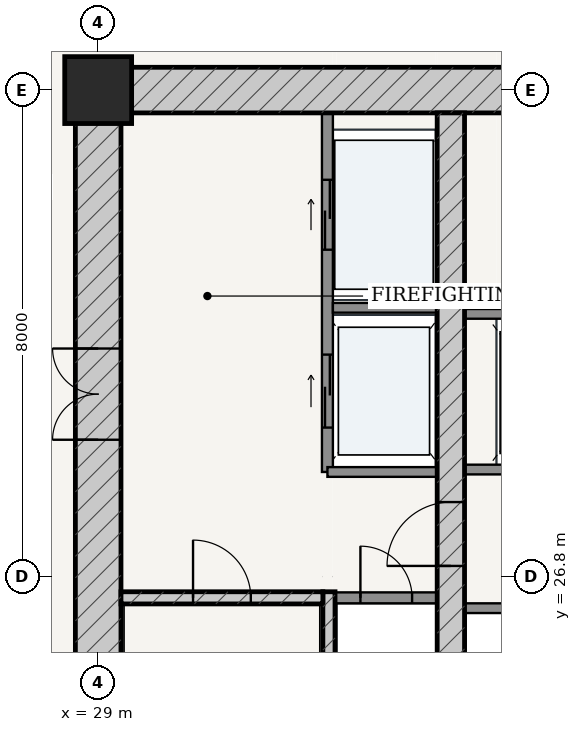
"""IFC4 building model, lengths in metres.
Left out: names, types, materials, properties, quantities, classifications, styles, units other than length and angle.
Written with IfcOpenShell. Run it as: python <this file> out.ifc"""

import sys

from ifc_helpers import new_model, si_unit, direction, frame, frame_2d, origin, origin_2d, place, context, subcontext, project, spatial, rectangle, extrude, source, transform, mapped, element, fill, save


model = new_model("IFC4")
c1 = context("Model", 3, precision=1e-05, world=origin(), true_north=direction((-0.2419218956, 0.970295726276)))
c2 = subcontext(c1, "Body", "Model", "MODEL_VIEW")
j1 = project(units=[si_unit("LENGTHUNIT", "METRE"), si_unit("PLANEANGLEUNIT", "RADIAN")], contexts=[c1])
p1 = place(None, origin())
s1 = spatial("IfcSite", under=j1, at=p1, CompositionType="ELEMENT")
p2 = place(p1, origin())
s2 = spatial("IfcBuilding", under=s1, at=p2, CompositionType="ELEMENT")
p3 = place(p2, frame((0.0, 0.0, 63.6)))
s3 = spatial("IfcBuildingStorey", under=s2, at=p3, CompositionType="ELEMENT", Elevation=63.6)
p4 = place(p3, frame((29.0, 34.8, 0.0), z_axis=(0.0, 0.0, 1.0), x_axis=(1.0, 0.0, 0.0)))
e1 = element("IfcColumn", 1, at=p4, inside=s3, PredefinedType="COLUMN", context=c2, shape_type="SweptSolid", body=[
    extrude(rectangle(XDim=1.1, YDim=1.1, at=origin_2d()), origin(), (0.0, 0.0, 1.0), 3.6),
])
p5 = place(p3, frame((28.625, 34.8, 0.0), z_axis=(0.0, 0.0, 1.0), x_axis=(1.0, 0.0, 0.0)))
e2 = element("IfcWall", 2, at=p5, inside=s3, PredefinedType="SHEAR", context=c2, shape_type="SweptSolid", body=[
    extrude(rectangle(XDim=18.75, YDim=0.75, at=frame_2d((9.375, 0.0))), origin(), (0.0, 0.0, 1.0), 3.32),
])
p6 = place(p5, frame((8.95, 0.0, 0.0)))
e3 = element("IfcOpeningElement", 3, at=p6, cuts=e2, PredefinedType="OPENING", context=c2, shape_type="SweptSolid", body=[
    extrude(rectangle(XDim=0.85, YDim=2.1, at=frame_2d((0.425, 1.05))), frame((0.0, 0.385, 0.0), z_axis=(0.0, -1.0, 0.0), x_axis=(1.0, 0.0, 0.0)), (0.0, 0.0, 1.0), 0.77),
])
p7 = place(p3, frame((29.0, 19.175, 0.0), z_axis=(0.0, 0.0, 1.0), x_axis=(0.0, 1.0, 0.0)))
e4 = element("IfcWall", 4, at=p7, inside=s3, PredefinedType="SHEAR", context=c2, shape_type="SweptSolid", body=[
    extrude(rectangle(XDim=15.25, YDim=0.75, at=frame_2d((7.625, 0.0))), origin(), (0.0, 0.0, 1.0), 3.32),
])
p8 = place(p7, frame((9.875, 0.0, 0.0)))
e5 = element("IfcOpeningElement", 5, at=p8, cuts=e4, PredefinedType="OPENING", context=c2, shape_type="SweptSolid", body=[
    extrude(rectangle(XDim=1.5, YDim=2.2, at=frame_2d((0.75, 1.1))), frame((0.0, 0.385, 0.0), z_axis=(0.0, -1.0, 0.0), x_axis=(1.0, 0.0, 0.0)), (0.0, 0.0, 1.0), 0.77),
])
p9 = place(p3, frame((32.795, 19.175, 0.0), z_axis=(0.0, 0.0, 1.0), x_axis=(0.0, 1.0, 0.0)))
e6 = element("IfcWall", 6, at=p9, inside=s3, PredefinedType="SOLIDWALL", context=c2, shape_type="SweptSolid", body=[
    extrude(rectangle(XDim=7.375, YDim=0.2, at=frame_2d((3.688, 0.0))), origin(), (0.0, 0.0, 1.0), 3.32),
])
p10 = place(p3, frame((29.375, 26.45, 0.0), z_axis=(0.0, 0.0, 1.0), x_axis=(1.0, 0.0, 0.0)))
e7 = element("IfcWall", 7, at=p10, inside=s3, PredefinedType="SOLIDWALL", context=c2, shape_type="SweptSolid", body=[
    extrude(rectangle(XDim=3.32, YDim=0.2, at=frame_2d((1.66, 0.0))), origin(), (0.0, 0.0, 1.0), 3.32),
])
p11 = place(p10, frame((1.185, 0.0, 0.0)))
e8 = element("IfcOpeningElement", 8, at=p11, cuts=e7, PredefinedType="OPENING", context=c2, shape_type="SweptSolid", body=[
    extrude(rectangle(XDim=0.95, YDim=2.15, at=frame_2d((0.475, 1.075))), frame((0.0, 0.11, 0.0), z_axis=(0.0, -1.0, 0.0), x_axis=(1.0, 0.0, 0.0)), (0.0, 0.0, 1.0), 0.22),
])
p12 = place(p3, frame((34.8, 19.175, 0.0), z_axis=(0.0, 0.0, 1.0), x_axis=(0.0, 1.0, 0.0)))
e9 = element("IfcWall", 9, at=p12, inside=s3, PredefinedType="SHEAR", context=c2, shape_type="SweptSolid", body=[
    extrude(rectangle(XDim=15.25, YDim=0.45, at=frame_2d((7.625, 0.0))), origin(), (0.0, 0.0, 1.0), 3.32),
])
p13 = place(p12, frame((7.8, 0.0, 0.0)))
e10 = element("IfcOpeningElement", 10, at=p13, cuts=e9, PredefinedType="OPENING", context=c2, shape_type="SweptSolid", body=[
    extrude(rectangle(XDim=1.05, YDim=2.15, at=frame_2d((0.525, 1.075))), frame((0.0, 0.235, 0.0), z_axis=(0.0, -1.0, 0.0), x_axis=(1.0, 0.0, 0.0)), (0.0, 0.0, 1.0), 0.47),
])
p14 = place(p3, frame((32.9, 26.45, 0.0), z_axis=(0.0, 0.0, 1.0), x_axis=(1.0, 0.0, 0.0)))
e11 = element("IfcWall", 11, at=p14, inside=s3, PredefinedType="PARTITIONING", context=c2, shape_type="SweptSolid", body=[
    extrude(rectangle(XDim=1.675, YDim=0.18, at=frame_2d((0.837, 0.0))), origin(), (0.0, 0.0, 1.0), 3.32),
])
p15 = place(p14, frame((0.413, 0.0, 0.0)))
e12 = element("IfcOpeningElement", 12, at=p15, cuts=e11, PredefinedType="OPENING", context=c2, shape_type="SweptSolid", body=[
    extrude(rectangle(XDim=0.85, YDim=2.1, at=frame_2d((0.425, 1.05))), frame((0.0, 0.1, 0.0), z_axis=(0.0, -1.0, 0.0), x_axis=(1.0, 0.0, 0.0)), (0.0, 0.0, 1.0), 0.2),
])
p16 = place(p3, frame((32.77, 28.52, 0.0), z_axis=(0.0, 0.0, 1.0), x_axis=(0.0, 1.0, 0.0)))
e13 = element("IfcWall", 13, at=p16, inside=s3, PredefinedType="PARTITIONING", context=c2, shape_type="SweptSolid", body=[
    extrude(rectangle(XDim=5.905, YDim=0.18, at=frame_2d((2.953, 0.0))), origin(), (0.0, 0.0, 1.0), 3.32),
])
p17 = place(p16, frame((3.655, 0.0, 0.0)))
e14 = element("IfcOpeningElement", 14, at=p17, cuts=e13, PredefinedType="OPENING", context=c2, shape_type="SweptSolid", body=[
    extrude(rectangle(XDim=1.15, YDim=2.2, at=frame_2d((0.575, 1.1))), frame((0.0, 0.1, 0.0), z_axis=(0.0, -1.0, 0.0), x_axis=(1.0, 0.0, 0.0)), (0.0, 0.0, 1.0), 0.2),
])
p18 = place(p16, frame((0.73, 0.0, 0.0)))
e15 = element("IfcOpeningElement", 15, at=p18, cuts=e13, PredefinedType="OPENING", context=c2, shape_type="SweptSolid", body=[
    extrude(rectangle(XDim=1.2, YDim=2.25, at=frame_2d((0.6, 1.125))), frame((0.0, 0.1, 0.0), z_axis=(0.0, -1.0, 0.0), x_axis=(1.0, 0.0, 0.0)), (0.0, 0.0, 1.0), 0.2),
])
p19 = place(p3, frame((32.86, 31.22, 0.0), z_axis=(0.0, 0.0, 1.0), x_axis=(1.0, 0.0, 0.0)))
e16 = element("IfcWall", 16, at=p19, inside=s3, PredefinedType="PARTITIONING", context=c2, shape_type="SweptSolid", body=[
    extrude(rectangle(XDim=1.715, YDim=0.16, at=frame_2d((0.857, 0.0))), origin(), (0.0, 0.0, 1.0), 3.32),
])
p20 = place(p3, frame((32.77, 28.52, 0.0), z_axis=(0.0, 0.0, 1.0), x_axis=(1.0, 0.0, 0.0)))
e17 = element("IfcWall", 17, at=p20, inside=s3, PredefinedType="PARTITIONING", context=c2, shape_type="SweptSolid", body=[
    extrude(rectangle(XDim=1.805, YDim=0.16, at=frame_2d((0.902, 0.0))), origin(), (0.0, 0.0, 1.0), 3.32),
])
p21 = place(p3, frame((35.025, 28.56, 0.0), z_axis=(0.0, 0.0, 1.0), x_axis=(1.0, 0.0, 0.0)))
e18 = element("IfcWall", 18, at=p21, inside=s3, PredefinedType="PARTITIONING", context=c2, shape_type="SweptSolid", body=[
    extrude(rectangle(XDim=5.95, YDim=0.16, at=frame_2d((2.975, 0.0))), origin(), (0.0, 0.0, 1.0), 3.32),
])
p22 = place(p21, frame((0.76, 0.0, 0.0)))
e19 = element("IfcOpeningElement", 19, at=p22, cuts=e18, PredefinedType="OPENING", context=c2, shape_type="SweptSolid", body=[
    extrude(rectangle(XDim=1.1, YDim=2.2, at=frame_2d((0.55, 1.1))), frame((0.0, 0.09, 0.0), z_axis=(0.0, -1.0, 0.0), x_axis=(1.0, 0.0, 0.0)), (0.0, 0.0, 1.0), 0.18),
])
p23 = place(p21, frame((2.425, 0.0, 0.0)))
e20 = element("IfcOpeningElement", 20, at=p23, cuts=e18, PredefinedType="OPENING", context=c2, shape_type="SweptSolid", body=[
    extrude(rectangle(XDim=1.1, YDim=2.2, at=frame_2d((0.55, 1.1))), frame((0.0, 0.09, 0.0), z_axis=(0.0, -1.0, 0.0), x_axis=(1.0, 0.0, 0.0)), (0.0, 0.0, 1.0), 0.18),
])
p24 = place(p21, frame((4.09, 0.0, 0.0)))
e21 = element("IfcOpeningElement", 21, at=p24, cuts=e18, PredefinedType="OPENING", context=c2, shape_type="SweptSolid", body=[
    extrude(rectangle(XDim=1.1, YDim=2.2, at=frame_2d((0.55, 1.1))), frame((0.0, 0.09, 0.0), z_axis=(0.0, -1.0, 0.0), x_axis=(1.0, 0.0, 0.0)), (0.0, 0.0, 1.0), 0.18),
])
for number, where, z_axis, x_axis in (
    (22, (35.025, 31.12, 0.0), (0.0, 0.0, 1.0), (1.0, 0.0, 0.0)),
    (23, (35.025, 26.28, 0.0), (0.0, 0.0, 1.0), (1.0, 0.0, 0.0)),
):
    element("IfcWall", number, at=place(p3, frame(where, z_axis=z_axis, x_axis=x_axis)), inside=s3, PredefinedType="PARTITIONING", context=c2, shape_type="SweptSolid", body=[
        extrude(rectangle(XDim=5.95, YDim=0.16, at=frame_2d((2.975, 0.0))), origin(), (0.0, 0.0, 1.0), 3.32),
    ])
m1 = source(origin(), c2, "Body", "SweptSolid", [
    extrude(rectangle(XDim=1.5, YDim=2.2, at=frame_2d((0.75, 1.1))), frame((0.0, 0.025, 0.0), z_axis=(0.0, -1.0, 0.0), x_axis=(1.0, 0.0, 0.0)), (0.0, 0.0, 1.0), 0.05),
])
p25 = place(p8, origin())
e24 = element("IfcDoor", 24, at=p25, inside=s3, OperationType="DOUBLE_DOOR_SINGLE_SWING", PredefinedType="DOOR", context=c2, shape_type="MappedRepresentation", body=[
    mapped(m1, transform((0.0, 0.0, 0.0), scale=1.0)),
])
fill(e5, e24)
m2 = source(origin(), c2, "Body", "SweptSolid", [
    extrude(rectangle(XDim=1.05, YDim=2.15, at=frame_2d((0.525, 1.075))), frame((0.0, 0.025, 0.0), z_axis=(0.0, -1.0, 0.0), x_axis=(1.0, 0.0, 0.0)), (0.0, 0.0, 1.0), 0.05),
])
p26 = place(p13, origin())
e25 = element("IfcDoor", 25, at=p26, inside=s3, OperationType="SINGLE_SWING_LEFT", PredefinedType="DOOR", context=c2, shape_type="MappedRepresentation", body=[
    mapped(m2, transform((0.0, 0.0, 0.0), scale=1.0)),
])
fill(e10, e25)
m3 = source(origin(), c2, "Body", "SweptSolid", [
    extrude(rectangle(XDim=0.95, YDim=2.15, at=frame_2d((0.475, 1.075))), frame((0.0, 0.025, 0.0), z_axis=(0.0, -1.0, 0.0), x_axis=(1.0, 0.0, 0.0)), (0.0, 0.0, 1.0), 0.05),
])
p27 = place(p11, origin())
e26 = element("IfcDoor", 26, at=p27, inside=s3, OperationType="SINGLE_SWING_LEFT", PredefinedType="DOOR", context=c2, shape_type="MappedRepresentation", body=[
    mapped(m3, transform((0.0, 0.0, 0.0), scale=1.0)),
])
fill(e8, e26)
m4 = source(origin(), c2, "Body", "SweptSolid", [
    extrude(rectangle(XDim=0.85, YDim=2.1, at=frame_2d((0.425, 1.05))), frame((0.0, 0.025, 0.0), z_axis=(0.0, -1.0, 0.0), x_axis=(1.0, 0.0, 0.0)), (0.0, 0.0, 1.0), 0.05),
])
p28 = place(p15, origin())
e27 = element("IfcDoor", 27, at=p28, inside=s3, OperationType="SINGLE_SWING_LEFT", PredefinedType="DOOR", context=c2, shape_type="MappedRepresentation", body=[
    mapped(m4, transform((0.0, 0.0, 0.0), scale=1.0)),
])
fill(e12, e27)
m5 = source(origin(), c2, "Body", "SweptSolid", [
    extrude(rectangle(XDim=1.15, YDim=2.2, at=frame_2d((0.575, 1.1))), frame((0.0, 0.025, 0.0), z_axis=(0.0, -1.0, 0.0), x_axis=(1.0, 0.0, 0.0)), (0.0, 0.0, 1.0), 0.05),
])
p29 = place(p17, origin())
e28 = element("IfcDoor", 28, at=p29, inside=s3, OperationType="DOUBLE_DOOR_SLIDING", PredefinedType="DOOR", context=c2, shape_type="MappedRepresentation", body=[
    mapped(m5, transform((0.0, 0.0, 0.0), scale=1.0)),
])
fill(e14, e28)
m6 = source(origin(), c2, "Body", "SweptSolid", [
    extrude(rectangle(XDim=1.2, YDim=2.25, at=frame_2d((0.6, 1.125))), frame((0.0, 0.025, 0.0), z_axis=(0.0, -1.0, 0.0), x_axis=(1.0, 0.0, 0.0)), (0.0, 0.0, 1.0), 0.05),
])
p30 = place(p18, origin())
e29 = element("IfcDoor", 29, at=p30, inside=s3, OperationType="DOUBLE_DOOR_SLIDING", PredefinedType="DOOR", context=c2, shape_type="MappedRepresentation", body=[
    mapped(m6, transform((0.0, 0.0, 0.0), scale=1.0)),
])
fill(e15, e29)
save(model, sys.argv[1])
